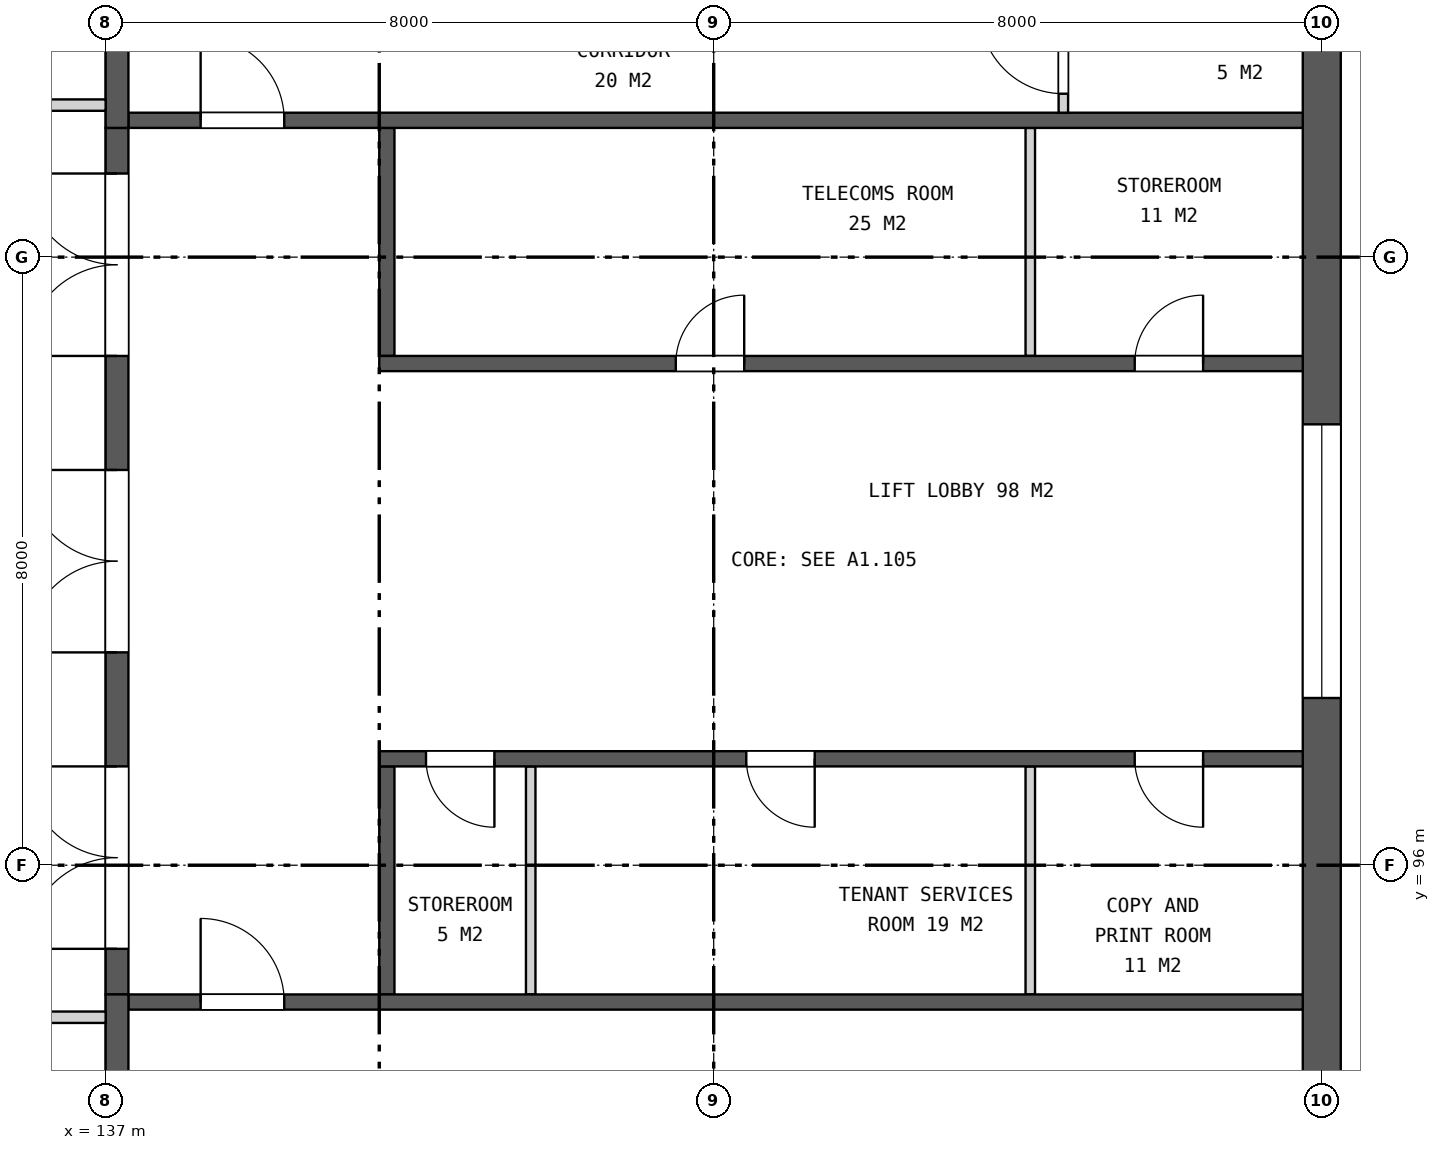
"""IFC4 building model, lengths in metres.
Left out: names, types, materials, properties, quantities, classifications, styles, units other than length and angle.
Written with IfcOpenShell. Run it as: python <this file> out.ifc"""

import sys

from ifc_helpers import new_model, si_unit, direction, frame, frame_2d, origin, place, context, subcontext, project, spatial, rectangle, extrude, element, fill, save


model = new_model("IFC4")
c1 = context("Model", 3, precision=1e-05, world=origin(), true_north=direction((0.0, 1.0)))
c2 = subcontext(c1, "Body", "Model", "MODEL_VIEW")
j1 = project(units=[si_unit("LENGTHUNIT", "METRE"), si_unit("PLANEANGLEUNIT", "RADIAN")], contexts=[c1])
p1 = place(None, origin())
s1 = spatial("IfcSite", under=j1, at=p1, CompositionType="ELEMENT")
p2 = place(p1, origin())
s2 = spatial("IfcBuilding", under=s1, at=p2, CompositionType="ELEMENT")
p3 = place(p2, frame((0.0, 0.0, 295.5)))
s3 = spatial("IfcBuildingStorey", under=s2, at=p3, CompositionType="ELEMENT", Elevation=295.5)
p4 = place(p3, frame((153.0, 88.25, 0.0), z_axis=(0.0, 0.0, 1.0), x_axis=(0.0, 1.0, 0.0)))
e1 = element("IfcWall", 1, at=p4, inside=s3, PredefinedType="SHEAR", context=c2, shape_type="SweptSolid", body=[
    extrude(rectangle(XDim=23.5, YDim=0.5, at=frame_2d((11.75, 0.0))), origin(), (0.0, 0.0, 1.0), 4.2),
])
p5 = place(p4, frame((9.95, 0.0, 0.15)))
e2 = element("IfcOpeningElement", 2, at=p5, cuts=e1, PredefinedType="OPENING", context=c2, shape_type="SweptSolid", body=[
    extrude(rectangle(XDim=3.6, YDim=3.0, at=frame_2d((1.8, 1.5))), frame((0.0, 0.26, 0.0), z_axis=(0.0, -1.0, 0.0), x_axis=(1.0, 0.0, 0.0)), (0.0, 0.0, 1.0), 0.52),
])
p6 = place(p3, frame((137.15, 94.3, 0.0), z_axis=(0.0, 0.0, 1.0), x_axis=(0.0, 1.0, 0.0)))
e3 = element("IfcWall", 3, at=p6, inside=s3, PredefinedType="SHEAR", context=c2, shape_type="SweptSolid", body=[
    extrude(rectangle(XDim=11.4, YDim=0.3, at=frame_2d((5.7, 0.0))), origin(), (0.0, 0.0, 1.0), 4.2),
])
p7 = place(p6, frame((0.6, 0.0, 0.0)))
e4 = element("IfcOpeningElement", 4, at=p7, cuts=e3, PredefinedType="OPENING", context=c2, shape_type="SweptSolid", body=[
    extrude(rectangle(XDim=2.4, YDim=2.4, at=frame_2d((1.2, 1.2))), frame((0.0, 0.16, 0.0), z_axis=(0.0, -1.0, 0.0), x_axis=(1.0, 0.0, 0.0)), (0.0, 0.0, 1.0), 0.32),
])
p8 = place(p6, frame((4.5, 0.0, 0.0)))
e5 = element("IfcOpeningElement", 5, at=p8, cuts=e3, PredefinedType="OPENING", context=c2, shape_type="SweptSolid", body=[
    extrude(rectangle(XDim=2.4, YDim=2.4, at=frame_2d((1.2, 1.2))), frame((0.0, 0.16, 0.0), z_axis=(0.0, -1.0, 0.0), x_axis=(1.0, 0.0, 0.0)), (0.0, 0.0, 1.0), 0.32),
])
p9 = place(p6, frame((8.4, 0.0, 0.0)))
e6 = element("IfcOpeningElement", 6, at=p9, cuts=e3, PredefinedType="OPENING", context=c2, shape_type="SweptSolid", body=[
    extrude(rectangle(XDim=2.4, YDim=2.4, at=frame_2d((1.2, 1.2))), frame((0.0, 0.16, 0.0), z_axis=(0.0, -1.0, 0.0), x_axis=(1.0, 0.0, 0.0)), (0.0, 0.0, 1.0), 0.32),
])
p10 = place(p3, frame((140.7, 102.7, 0.0), z_axis=(0.0, 0.0, 1.0), x_axis=(0.0, 1.0, 0.0)))
e7 = element("IfcWall", 7, at=p10, inside=s3, PredefinedType="SHEAR", context=c2, shape_type="SweptSolid", body=[
    extrude(rectangle(XDim=3.0, YDim=0.2, at=frame_2d((1.5, 0.0))), origin(), (0.0, 0.0, 1.0), 4.2),
])
p11 = place(p3, frame((149.165, 102.7, 0.0), z_axis=(0.0, 0.0, 1.0), x_axis=(0.0, 1.0, 0.0)))
e8 = element("IfcWall", 8, at=p11, inside=s3, PredefinedType="PARTITIONING", context=c2, shape_type="SweptSolid", body=[
    extrude(rectangle(XDim=3.0, YDim=0.125, at=frame_2d((1.5, 0.0))), origin(), (0.0, 0.0, 1.0), 4.2),
])
p12 = place(p3, frame((140.6, 102.6, 0.0), z_axis=(0.0, 0.0, 1.0), x_axis=(1.0, 0.0, 0.0)))
e9 = element("IfcWall", 9, at=p12, inside=s3, PredefinedType="SHEAR", context=c2, shape_type="SweptSolid", body=[
    extrude(rectangle(XDim=12.15, YDim=0.2, at=frame_2d((6.075, 0.0))), origin(), (0.0, 0.0, 1.0), 4.2),
])
p13 = place(p12, frame((3.901, 0.0, 0.0)))
e10 = element("IfcOpeningElement", 10, at=p13, cuts=e9, PredefinedType="OPENING", context=c2, shape_type="SweptSolid", body=[
    extrude(rectangle(XDim=0.9, YDim=2.1, at=frame_2d((0.45, 1.05))), frame((0.0, 0.11, 0.0), z_axis=(0.0, -1.0, 0.0), x_axis=(1.0, 0.0, 0.0)), (0.0, 0.0, 1.0), 0.22),
])
p14 = place(p12, frame((9.939, 0.0, 0.0)))
e11 = element("IfcOpeningElement", 11, at=p14, cuts=e9, PredefinedType="OPENING", context=c2, shape_type="SweptSolid", body=[
    extrude(rectangle(XDim=0.9, YDim=2.1, at=frame_2d((0.45, 1.05))), frame((0.0, 0.11, 0.0), z_axis=(0.0, -1.0, 0.0), x_axis=(1.0, 0.0, 0.0)), (0.0, 0.0, 1.0), 0.22),
])
p15 = place(p3, frame((140.7, 94.3, 0.0), z_axis=(0.0, 0.0, 1.0), x_axis=(0.0, 1.0, 0.0)))
e12 = element("IfcWall", 12, at=p15, inside=s3, PredefinedType="SHEAR", context=c2, shape_type="SweptSolid", body=[
    extrude(rectangle(XDim=3.0, YDim=0.2, at=frame_2d((1.5, 0.0))), origin(), (0.0, 0.0, 1.0), 4.2),
])
for number, where, z_axis, x_axis in (
    (13, (142.593, 94.3, 0.0), (0.0, 0.0, 1.0), (0.0, 1.0, 0.0)),
    (14, (149.165, 94.3, 0.0), (0.0, 0.0, 1.0), (0.0, 1.0, 0.0)),
):
    element("IfcWall", number, at=place(p3, frame(where, z_axis=z_axis, x_axis=x_axis)), inside=s3, PredefinedType="PARTITIONING", context=c2, shape_type="SweptSolid", body=[
        extrude(rectangle(XDim=3.0, YDim=0.125, at=frame_2d((1.5, 0.0))), origin(), (0.0, 0.0, 1.0), 4.2),
    ])
p16 = place(p3, frame((140.6, 97.4, 0.0), z_axis=(0.0, 0.0, 1.0), x_axis=(1.0, 0.0, 0.0)))
e15 = element("IfcWall", 15, at=p16, inside=s3, PredefinedType="SHEAR", context=c2, shape_type="SweptSolid", body=[
    extrude(rectangle(XDim=12.15, YDim=0.2, at=frame_2d((6.075, 0.0))), origin(), (0.0, 0.0, 1.0), 4.2),
])
p17 = place(p16, frame((0.615, 0.0, 0.0)))
e16 = element("IfcOpeningElement", 16, at=p17, cuts=e15, PredefinedType="OPENING", context=c2, shape_type="SweptSolid", body=[
    extrude(rectangle(XDim=0.9, YDim=2.1, at=frame_2d((0.45, 1.05))), frame((0.0, 0.11, 0.0), z_axis=(0.0, -1.0, 0.0), x_axis=(1.0, 0.0, 0.0)), (0.0, 0.0, 1.0), 0.22),
])
p18 = place(p16, frame((4.829, 0.0, 0.0)))
e17 = element("IfcOpeningElement", 17, at=p18, cuts=e15, PredefinedType="OPENING", context=c2, shape_type="SweptSolid", body=[
    extrude(rectangle(XDim=0.9, YDim=2.1, at=frame_2d((0.45, 1.05))), frame((0.0, 0.11, 0.0), z_axis=(0.0, -1.0, 0.0), x_axis=(1.0, 0.0, 0.0)), (0.0, 0.0, 1.0), 0.22),
])
p19 = place(p16, frame((9.939, 0.0, 0.0)))
e18 = element("IfcOpeningElement", 18, at=p19, cuts=e15, PredefinedType="OPENING", context=c2, shape_type="SweptSolid", body=[
    extrude(rectangle(XDim=0.9, YDim=2.1, at=frame_2d((0.45, 1.05))), frame((0.0, 0.11, 0.0), z_axis=(0.0, -1.0, 0.0), x_axis=(1.0, 0.0, 0.0)), (0.0, 0.0, 1.0), 0.22),
])
p20 = place(p3, frame((137.3, 105.8, 0.0), z_axis=(0.0, 0.0, 1.0), x_axis=(1.0, 0.0, 0.0)))
e19 = element("IfcWall", 19, at=p20, inside=s3, PredefinedType="SHEAR", context=c2, shape_type="SweptSolid", body=[
    extrude(rectangle(XDim=15.45, YDim=0.2, at=frame_2d((7.725, 0.0))), origin(), (0.0, 0.0, 1.0), 4.2),
])
p21 = place(p20, frame((0.95, 0.0, 0.0)))
e20 = element("IfcOpeningElement", 20, at=p21, cuts=e19, PredefinedType="OPENING", context=c2, shape_type="SweptSolid", body=[
    extrude(rectangle(XDim=1.1, YDim=2.1, at=frame_2d((0.55, 1.05))), frame((0.0, 0.11, 0.0), z_axis=(0.0, -1.0, 0.0), x_axis=(1.0, 0.0, 0.0)), (0.0, 0.0, 1.0), 0.22),
])
p22 = place(p3, frame((137.15, 105.7, 0.0), z_axis=(0.0, 0.0, 1.0), x_axis=(0.0, 1.0, 0.0)))
e21 = element("IfcWall", 21, at=p22, inside=s3, PredefinedType="SHEAR", context=c2, shape_type="SweptSolid", body=[
    extrude(rectangle(XDim=6.05, YDim=0.3, at=frame_2d((3.025, 0.0))), origin(), (0.0, 0.0, 1.0), 4.2),
])
p23 = place(p3, frame((149.6, 105.9, 0.0), z_axis=(0.0, 0.0, 1.0), x_axis=(0.0, 1.0, 0.0)))
e22 = element("IfcWall", 22, at=p23, inside=s3, PredefinedType="PARTITIONING", context=c2, shape_type="SweptSolid", body=[
    extrude(rectangle(XDim=1.6, YDim=0.125, at=frame_2d((0.8, 0.0))), origin(), (0.0, 0.0, 1.0), 4.2),
])
p24 = place(p23, frame((0.25, 0.0, 0.0)))
e23 = element("IfcOpeningElement", 23, at=p24, cuts=e22, PredefinedType="OPENING", context=c2, shape_type="SweptSolid", body=[
    extrude(rectangle(XDim=1.1, YDim=2.1, at=frame_2d((0.55, 1.05))), frame((0.0, 0.073, 0.0), z_axis=(0.0, -1.0, 0.0), x_axis=(1.0, 0.0, 0.0)), (0.0, 0.0, 1.0), 0.145),
])
p25 = place(p3, frame((137.3, 94.2, 0.0), z_axis=(0.0, 0.0, 1.0), x_axis=(1.0, 0.0, 0.0)))
e24 = element("IfcWall", 24, at=p25, inside=s3, PredefinedType="SHEAR", context=c2, shape_type="SweptSolid", body=[
    extrude(rectangle(XDim=15.45, YDim=0.2, at=frame_2d((7.725, 0.0))), origin(), (0.0, 0.0, 1.0), 4.2),
])
p26 = place(p25, frame((0.95, 0.0, 0.0)))
e25 = element("IfcOpeningElement", 25, at=p26, cuts=e24, PredefinedType="OPENING", context=c2, shape_type="SweptSolid", body=[
    extrude(rectangle(XDim=1.1, YDim=2.1, at=frame_2d((0.55, 1.05))), frame((0.0, 0.11, 0.0), z_axis=(0.0, -1.0, 0.0), x_axis=(1.0, 0.0, 0.0)), (0.0, 0.0, 1.0), 0.22),
])
p27 = place(p3, frame((137.15, 88.25, 0.0), z_axis=(0.0, 0.0, 1.0), x_axis=(0.0, 1.0, 0.0)))
e26 = element("IfcWall", 26, at=p27, inside=s3, PredefinedType="SHEAR", context=c2, shape_type="SweptSolid", body=[
    extrude(rectangle(XDim=6.05, YDim=0.3, at=frame_2d((3.025, 0.0))), origin(), (0.0, 0.0, 1.0), 4.2),
])
for number, where, z_axis, x_axis in (
    (27, (131.475, 94.0, 0.0), (0.0, 0.0, 1.0), (1.0, 0.0, 0.0)),
    (28, (131.475, 106.0, 0.0), (0.0, 0.0, 1.0), (1.0, 0.0, 0.0)),
):
    element("IfcWall", number, at=place(p3, frame(where, z_axis=z_axis, x_axis=x_axis)), inside=s3, PredefinedType="PARTITIONING", context=c2, shape_type="SweptSolid", body=[
        extrude(rectangle(XDim=5.525, YDim=0.15, at=frame_2d((2.762, 0.0))), origin(), (0.0, 0.0, 1.0), 3.443),
    ])
p28 = place(p5, origin())
e29 = element("IfcWindow", 29, at=p28, inside=s3, PartitioningType="SINGLE_PANEL", PredefinedType="WINDOW", context=c2, shape_type="SweptSolid", body=[
    extrude(rectangle(XDim=3.6, YDim=3.0, at=frame_2d((1.8, 1.5))), frame((0.0, 0.03, 0.0), z_axis=(0.0, -1.0, 0.0), x_axis=(1.0, 0.0, 0.0)), (0.0, 0.0, 1.0), 0.06),
])
fill(e2, e29)
p29 = place(p7, origin())
e30 = element("IfcDoor", 30, at=p29, inside=s3, OperationType="DOUBLE_DOOR_SINGLE_SWING", PredefinedType="DOOR", context=c2, shape_type="SweptSolid", body=[
    extrude(rectangle(XDim=2.4, YDim=2.4, at=frame_2d((1.2, 1.2))), frame((0.0, 0.025, 0.0), z_axis=(0.0, -1.0, 0.0), x_axis=(1.0, 0.0, 0.0)), (0.0, 0.0, 1.0), 0.05),
])
fill(e4, e30)
p30 = place(p8, origin())
e31 = element("IfcDoor", 31, at=p30, inside=s3, OperationType="DOUBLE_DOOR_SINGLE_SWING", PredefinedType="DOOR", context=c2, shape_type="SweptSolid", body=[
    extrude(rectangle(XDim=2.4, YDim=2.4, at=frame_2d((1.2, 1.2))), frame((0.0, 0.025, 0.0), z_axis=(0.0, -1.0, 0.0), x_axis=(1.0, 0.0, 0.0)), (0.0, 0.0, 1.0), 0.05),
])
fill(e5, e31)
p31 = place(p9, origin())
e32 = element("IfcDoor", 32, at=p31, inside=s3, OperationType="DOUBLE_DOOR_SINGLE_SWING", PredefinedType="DOOR", context=c2, shape_type="SweptSolid", body=[
    extrude(rectangle(XDim=2.4, YDim=2.4, at=frame_2d((1.2, 1.2))), frame((0.0, 0.025, 0.0), z_axis=(0.0, -1.0, 0.0), x_axis=(1.0, 0.0, 0.0)), (0.0, 0.0, 1.0), 0.05),
])
fill(e6, e32)
p32 = place(p13, origin())
e33 = element("IfcDoor", 33, at=p32, inside=s3, OperationType="SINGLE_SWING_RIGHT", PredefinedType="DOOR", context=c2, shape_type="SweptSolid", body=[
    extrude(rectangle(XDim=0.9, YDim=2.1, at=frame_2d((0.45, 1.05))), frame((0.0, 0.025, 0.0), z_axis=(0.0, -1.0, 0.0), x_axis=(1.0, 0.0, 0.0)), (0.0, 0.0, 1.0), 0.05),
])
fill(e10, e33)
p33 = place(p14, origin())
e34 = element("IfcDoor", 34, at=p33, inside=s3, OperationType="SINGLE_SWING_RIGHT", PredefinedType="DOOR", context=c2, shape_type="SweptSolid", body=[
    extrude(rectangle(XDim=0.9, YDim=2.1, at=frame_2d((0.45, 1.05))), frame((0.0, 0.025, 0.0), z_axis=(0.0, -1.0, 0.0), x_axis=(1.0, 0.0, 0.0)), (0.0, 0.0, 1.0), 0.05),
])
fill(e11, e34)
p34 = place(p17, frame((0.9, 0.0, 0.0), z_axis=(0.0, 0.0, 1.0), x_axis=(-1.0, 0.0, 0.0)))
e35 = element("IfcDoor", 35, at=p34, inside=s3, OperationType="SINGLE_SWING_LEFT", PredefinedType="DOOR", context=c2, shape_type="SweptSolid", body=[
    extrude(rectangle(XDim=0.9, YDim=2.1, at=frame_2d((0.45, 1.05))), frame((0.0, 0.025, 0.0), z_axis=(0.0, -1.0, 0.0), x_axis=(1.0, 0.0, 0.0)), (0.0, 0.0, 1.0), 0.05),
])
fill(e16, e35)
p35 = place(p18, frame((0.9, 0.0, 0.0), z_axis=(0.0, 0.0, 1.0), x_axis=(-1.0, 0.0, 0.0)))
e36 = element("IfcDoor", 36, at=p35, inside=s3, OperationType="SINGLE_SWING_LEFT", PredefinedType="DOOR", context=c2, shape_type="SweptSolid", body=[
    extrude(rectangle(XDim=0.9, YDim=2.1, at=frame_2d((0.45, 1.05))), frame((0.0, 0.025, 0.0), z_axis=(0.0, -1.0, 0.0), x_axis=(1.0, 0.0, 0.0)), (0.0, 0.0, 1.0), 0.05),
])
fill(e17, e36)
p36 = place(p19, frame((0.9, 0.0, 0.0), z_axis=(0.0, 0.0, 1.0), x_axis=(-1.0, 0.0, 0.0)))
e37 = element("IfcDoor", 37, at=p36, inside=s3, OperationType="SINGLE_SWING_LEFT", PredefinedType="DOOR", context=c2, shape_type="SweptSolid", body=[
    extrude(rectangle(XDim=0.9, YDim=2.1, at=frame_2d((0.45, 1.05))), frame((0.0, 0.025, 0.0), z_axis=(0.0, -1.0, 0.0), x_axis=(1.0, 0.0, 0.0)), (0.0, 0.0, 1.0), 0.05),
])
fill(e18, e37)
p37 = place(p21, origin())
e38 = element("IfcDoor", 38, at=p37, inside=s3, OperationType="SINGLE_SWING_LEFT", PredefinedType="DOOR", context=c2, shape_type="SweptSolid", body=[
    extrude(rectangle(XDim=1.1, YDim=2.1, at=frame_2d((0.55, 1.05))), frame((0.0, 0.025, 0.0), z_axis=(0.0, -1.0, 0.0), x_axis=(1.0, 0.0, 0.0)), (0.0, 0.0, 1.0), 0.05),
])
fill(e20, e38)
p38 = place(p24, origin())
e39 = element("IfcDoor", 39, at=p38, inside=s3, OperationType="SINGLE_SWING_RIGHT", PredefinedType="DOOR", context=c2, shape_type="SweptSolid", body=[
    extrude(rectangle(XDim=1.1, YDim=2.1, at=frame_2d((0.55, 1.05))), frame((0.0, 0.025, 0.0), z_axis=(0.0, -1.0, 0.0), x_axis=(1.0, 0.0, 0.0)), (0.0, 0.0, 1.0), 0.05),
])
fill(e23, e39)
p39 = place(p26, origin())
e40 = element("IfcDoor", 40, at=p39, inside=s3, OperationType="SINGLE_SWING_LEFT", PredefinedType="DOOR", context=c2, shape_type="SweptSolid", body=[
    extrude(rectangle(XDim=1.1, YDim=2.1, at=frame_2d((0.55, 1.05))), frame((0.0, 0.025, 0.0), z_axis=(0.0, -1.0, 0.0), x_axis=(1.0, 0.0, 0.0)), (0.0, 0.0, 1.0), 0.05),
])
fill(e25, e40)
save(model, sys.argv[1])
